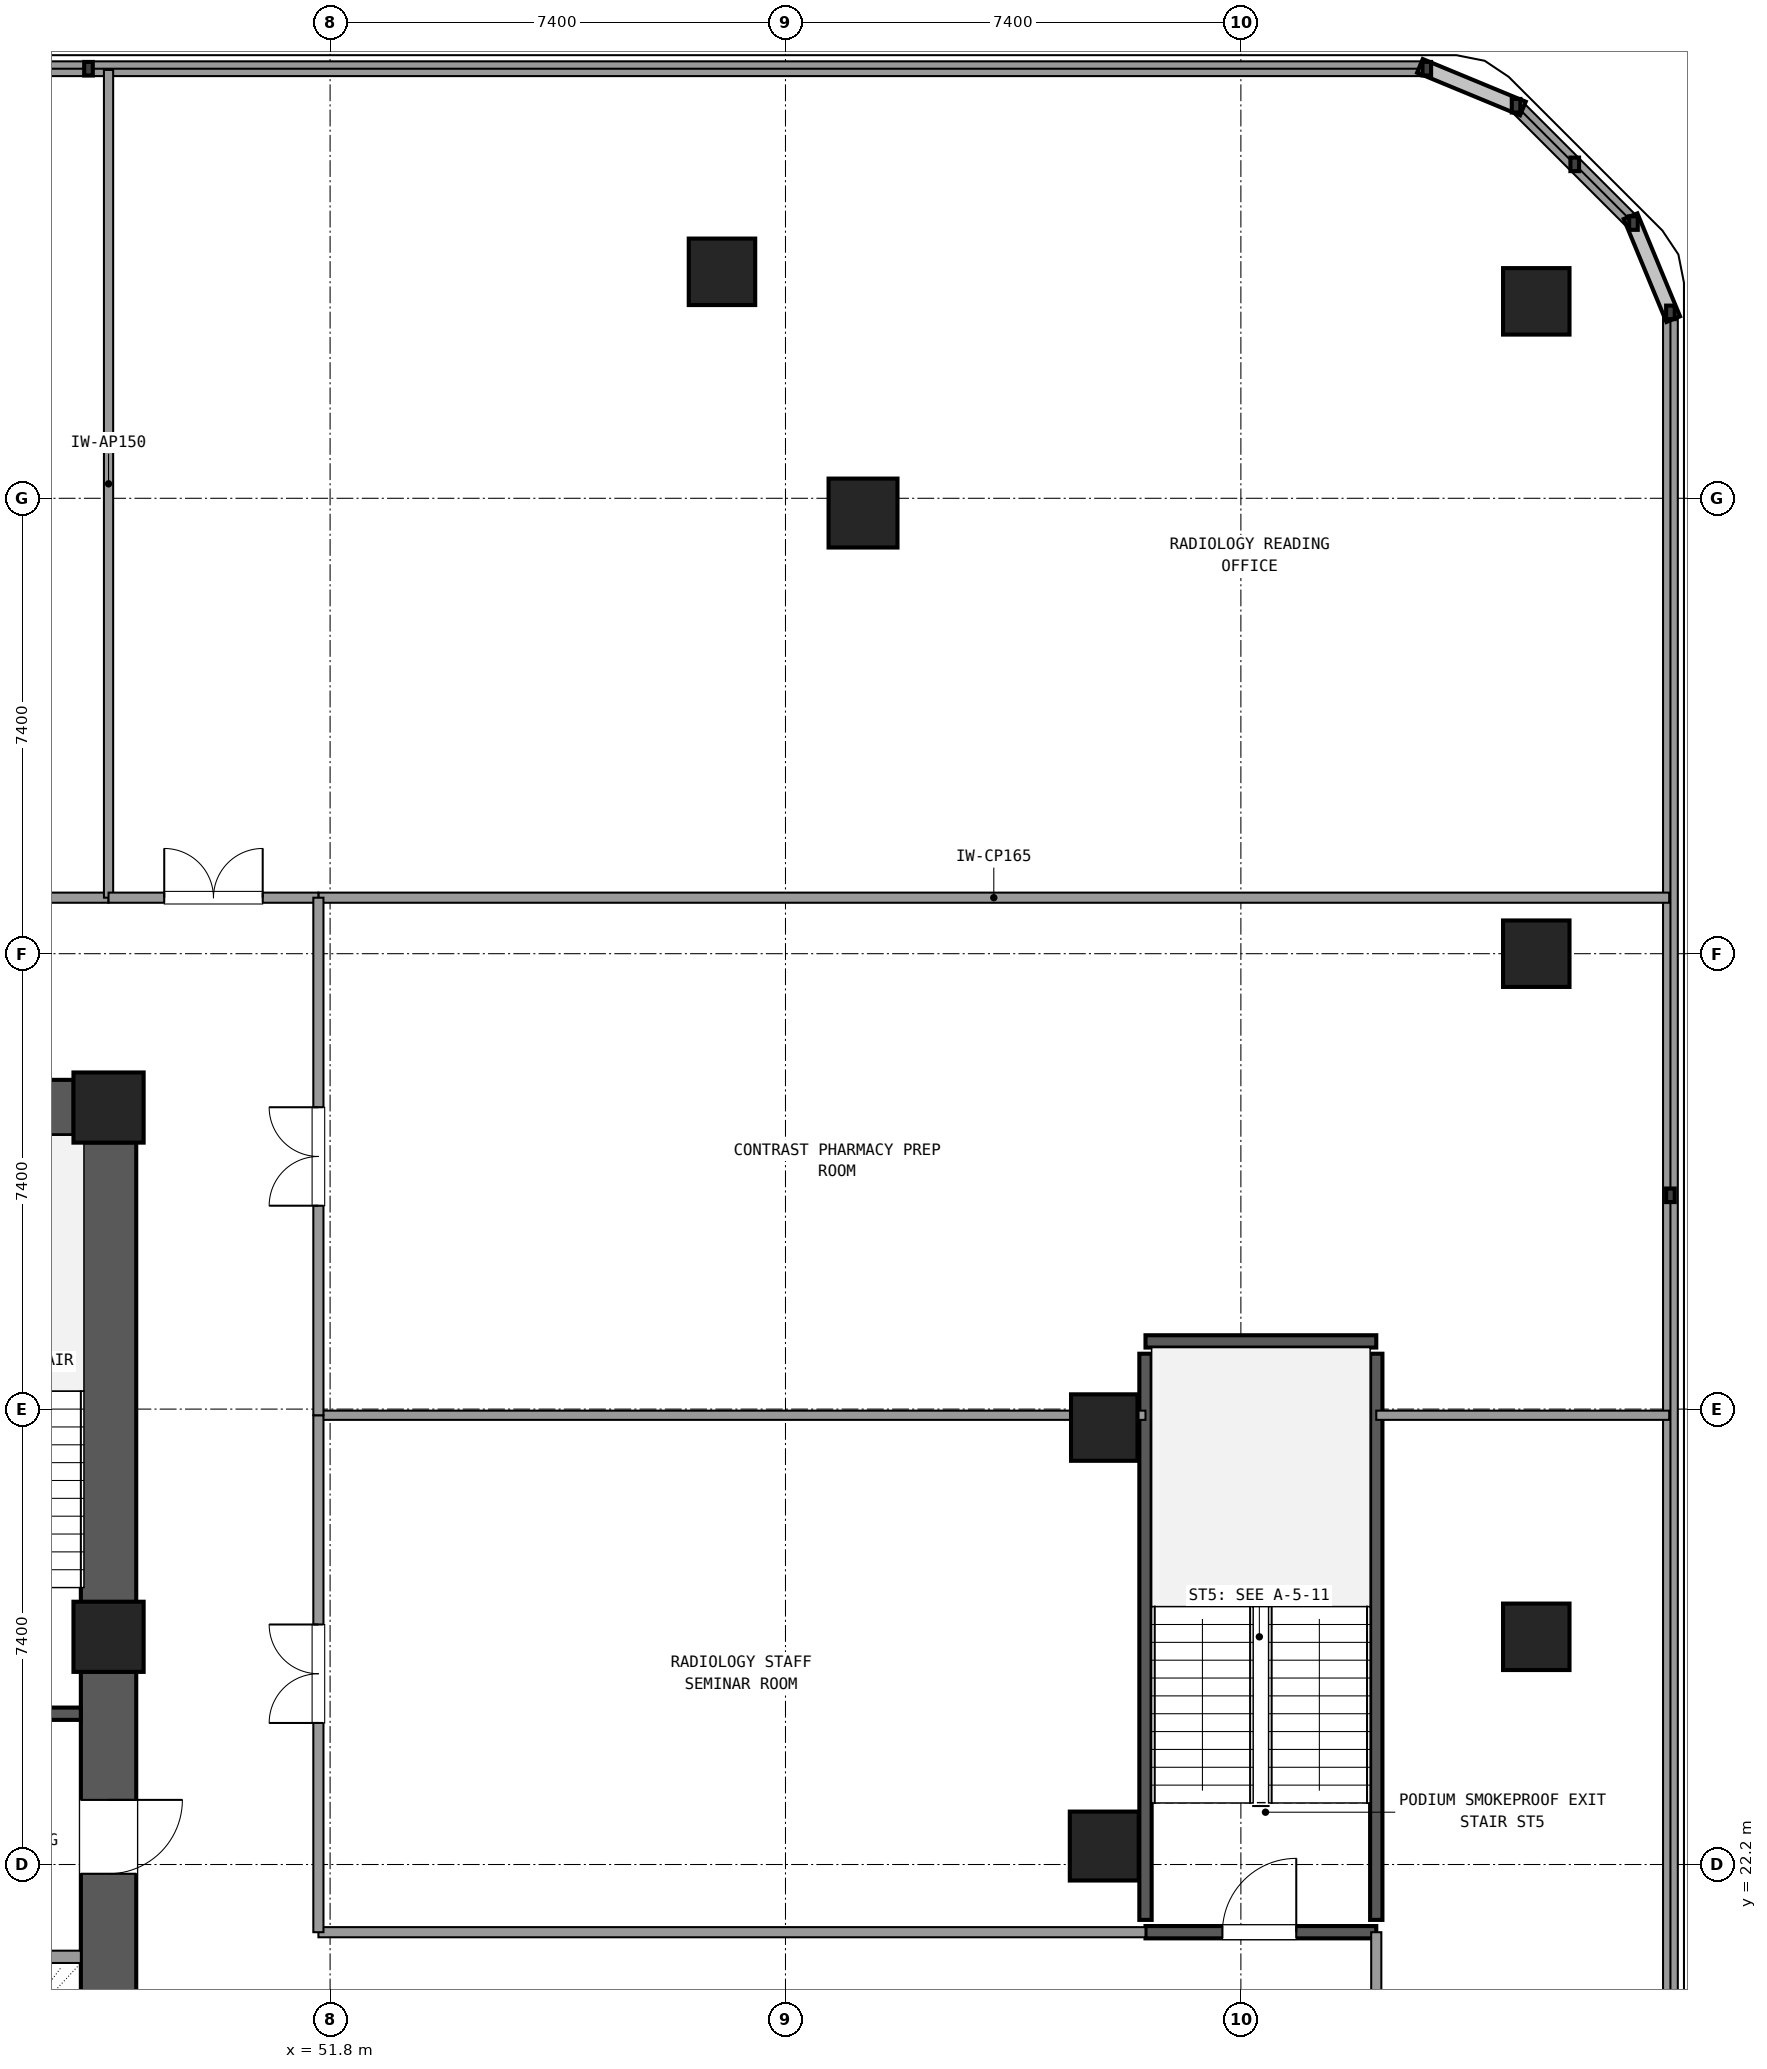
"""IFC4 building model, lengths in metres.
Left out: names, types, materials, properties, quantities, classifications, styles, units other than length and angle.
Written with IfcOpenShell. Run it as: python <this file> out.ifc"""

import sys

from ifc_helpers import new_model, si_unit, direction, frame, frame_2d, origin, origin_2d, place, context, subcontext, project, spatial, rectangle, circle, extrude, element, fill, save


model = new_model("IFC4")
c1 = context("Model", 3, precision=1e-05, world=origin(), true_north=direction((0.0, 1.0)))
c2 = subcontext(c1, "Body", "Model", "MODEL_VIEW")
j1 = project(units=[si_unit("LENGTHUNIT", "METRE"), si_unit("PLANEANGLEUNIT", "RADIAN")], contexts=[c1])
p1 = place(None, origin())
s1 = spatial("IfcSite", under=j1, at=p1, CompositionType="ELEMENT")
p2 = place(p1, origin())
s2 = spatial("IfcBuilding", under=s1, at=p2, CompositionType="ELEMENT")
p3 = place(p2, frame((0.0, 0.0, 9.9)))
s3 = spatial("IfcBuildingStorey", under=s2, at=p3, CompositionType="ELEMENT", Elevation=9.9)
for number, where, z_axis, x_axis in (
    (1, (48.2, 25.9, 0.0), (0.0, 0.0, 1.0), (1.0, 0.0, 0.0)),
    (2, (48.2, 34.5, 0.0), (0.0, 0.0, 1.0), (1.0, 0.0, 0.0)),
):
    element("IfcColumn", number, at=place(p3, frame(where, z_axis=z_axis, x_axis=x_axis)), inside=s3, PredefinedType="COLUMN", context=c2, shape_type="SweptSolid", body=[
        extrude(rectangle(XDim=1.14, YDim=1.14, at=origin_2d()), origin(), (0.0, 0.0, 1.0), 4.5),
    ])
p4 = place(p3, frame((48.2, 17.865, 0.0), z_axis=(0.0, 0.0, 1.0), x_axis=(0.0, 1.0, 0.0)))
e3 = element("IfcWall", 3, at=p4, inside=s3, PredefinedType="SHEAR", context=c2, shape_type="SweptSolid", body=[
    extrude(rectangle(XDim=7.47, YDim=0.9, at=frame_2d((3.735, 0.0))), origin(), (0.0, 0.0, 1.0), 4.2),
])
p5 = place(p4, frame((4.185, 0.0, 0.0)))
e4 = element("IfcOpeningElement", 4, at=p5, cuts=e3, PredefinedType="OPENING", context=c2, shape_type="SweptSolid", body=[
    extrude(rectangle(XDim=1.2, YDim=2.15, at=frame_2d((0.6, 1.075))), frame((0.0, 0.46, 0.0), z_axis=(0.0, -1.0, 0.0), x_axis=(1.0, 0.0, 0.0)), (0.0, 0.0, 1.0), 0.92),
])
p6 = place(p3, frame((48.2, 26.465, 0.0), z_axis=(0.0, 0.0, 1.0), x_axis=(0.0, 1.0, 0.0)))
e5 = element("IfcWall", 5, at=p6, inside=s3, PredefinedType="SHEAR", context=c2, shape_type="SweptSolid", body=[
    extrude(rectangle(XDim=7.47, YDim=0.9, at=frame_2d((3.735, 0.0))), origin(), (0.0, 0.0, 1.0), 4.2),
])
p7 = place(p3, frame((47.635, 34.5, 0.0), z_axis=(0.0, 0.0, 1.0), x_axis=(-1.0, 0.0, 0.0)))
e6 = element("IfcWall", 6, at=p7, inside=s3, PredefinedType="SHEAR", context=c2, shape_type="SweptSolid", body=[
    extrude(rectangle(XDim=10.07, YDim=0.9, at=frame_2d((5.035, 0.0))), origin(), (0.0, 0.0, 1.0), 4.2),
])
p8 = place(p7, frame((4.535, 0.0, 0.0)))
e7 = element("IfcOpeningElement", 7, at=p8, cuts=e6, PredefinedType="OPENING", context=c2, shape_type="SweptSolid", body=[
    extrude(rectangle(XDim=1.6, YDim=2.2, at=frame_2d((0.8, 1.1))), frame((0.0, 0.46, 0.0), z_axis=(0.0, -1.0, 0.0), x_axis=(1.0, 0.0, 0.0)), (0.0, 0.0, 1.0), 0.92),
])
p9 = place(p3, frame((64.38, 22.5, 0.0), z_axis=(0.0, 0.0, 1.0), x_axis=(1.0, 0.0, 0.0)))
e8 = element("IfcColumn", 8, at=p9, inside=s3, PredefinedType="COLUMN", context=c2, shape_type="SweptSolid", body=[
    extrude(circle(Radius=0.56, at=origin_2d()), origin(), (0.0, 0.0, 1.0), 4.5),
])
p10 = place(p3, frame((64.38, 29.3, 0.0), z_axis=(0.0, 0.0, 1.0), x_axis=(1.0, 0.0, 0.0)))
e9 = element("IfcColumn", 9, at=p10, inside=s3, PredefinedType="COLUMN", context=c2, shape_type="SweptSolid", body=[
    extrude(rectangle(XDim=1.08, YDim=1.08, at=origin_2d()), origin(), (0.0, 0.0, 1.0), 4.5),
])
p11 = place(p3, frame((60.46, 44.16, 0.0), z_axis=(0.0, 0.0, 1.0), x_axis=(1.0, 0.0, 0.0)))
e10 = element("IfcColumn", 10, at=p11, inside=s3, PredefinedType="COLUMN", context=c2, shape_type="SweptSolid", body=[
    extrude(circle(Radius=0.56, at=origin_2d()), origin(), (0.0, 0.0, 1.0), 4.5),
])
for number, where, z_axis, x_axis in (
    (11, (58.168, 48.08, 0.0), (0.0, 0.0, 1.0), (1.0, 0.0, 0.0)),
    (12, (71.4, 25.9, 0.0), (0.0, 0.0, 1.0), (1.0, 0.0, 0.0)),
    (13, (71.4, 37.0, 0.0), (0.0, 0.0, 1.0), (1.0, 0.0, 0.0)),
    (14, (71.4, 47.6, 0.0), (0.0, 0.0, 1.0), (1.0, 0.0, 0.0)),
):
    element("IfcColumn", number, at=place(p3, frame(where, z_axis=z_axis, x_axis=x_axis)), inside=s3, PredefinedType="COLUMN", context=c2, shape_type="SweptSolid", body=[
        extrude(rectangle(XDim=1.08, YDim=1.08, at=origin_2d()), origin(), (0.0, 0.0, 1.0), 4.5),
    ])
p12 = place(p3, frame((73.58, 4.379, 0.0), z_axis=(0.0, 0.0, 1.0), x_axis=(0.0, 1.0, 0.0)))
e15 = element("IfcWall", 15, at=p12, inside=s3, PredefinedType="SOLIDWALL", context=c2, shape_type="SweptSolid", body=[
    extrude(rectangle(XDim=43.042, YDim=0.24, at=frame_2d((21.521, 0.0))), origin(), (0.0, 0.0, 1.0), 0.85),
])
p13 = place(p3, frame((72.979, 48.872, 0.0), z_axis=(0.0, 0.0, 1.0), x_axis=(-0.707106781187, 0.707106781187, 0.0)))
e16 = element("IfcWall", 16, at=p13, inside=s3, PredefinedType="SOLIDWALL", context=c2, shape_type="SweptSolid", body=[
    extrude(rectangle(XDim=2.697, YDim=0.24, at=frame_2d((1.348, 0.0))), origin(), (0.0, 0.0, 1.0), 0.85),
])
p14 = place(p3, frame((69.621, 51.38, 0.0), z_axis=(0.0, 0.0, 1.0), x_axis=(-1.0, 0.0, 0.0)))
e17 = element("IfcWall", 17, at=p14, inside=s3, PredefinedType="SOLIDWALL", context=c2, shape_type="SweptSolid", body=[
    extrude(rectangle(XDim=65.242, YDim=0.24, at=frame_2d((32.621, 0.0))), origin(), (0.0, 0.0, 1.0), 0.85),
])
p15 = place(p3, frame((43.35, 24.65, 0.0), z_axis=(0.0, 0.0, 1.0), x_axis=(1.0, 0.0, 0.0)))
e18 = element("IfcWall", 18, at=p15, inside=s3, PredefinedType="SHEAR", context=c2, shape_type="SweptSolid", body=[
    extrude(rectangle(XDim=4.4, YDim=0.2, at=frame_2d((2.2, 0.0))), origin(), (0.0, 0.0, 1.0), 4.2),
])
p16 = place(p15, frame((2.0, 0.0, 0.0)))
e19 = element("IfcOpeningElement", 19, at=p16, cuts=e18, PredefinedType="OPENING", context=c2, shape_type="SweptSolid", body=[
    extrude(rectangle(XDim=1.2, YDim=2.15, at=frame_2d((0.6, 1.075))), frame((0.0, 0.11, 0.0), z_axis=(0.0, -1.0, 0.0), x_axis=(1.0, 0.0, 0.0)), (0.0, 0.0, 1.0), 0.22),
])
p17 = place(p3, frame((43.35, 20.7, 0.0), z_axis=(0.0, 0.0, 1.0), x_axis=(1.0, 0.0, 0.0)))
e20 = element("IfcWall", 20, at=p17, inside=s3, PredefinedType="SOLIDWALL", context=c2, shape_type="SweptSolid", body=[
    extrude(rectangle(XDim=4.4, YDim=0.2, at=frame_2d((2.2, 0.0))), origin(), (0.0, 0.0, 1.0), 3.21),
])
p18 = place(p17, frame((2.35, 0.0, 0.0)))
e21 = element("IfcOpeningElement", 21, at=p18, cuts=e20, PredefinedType="OPENING", context=c2, shape_type="SweptSolid", body=[
    extrude(rectangle(XDim=1.2, YDim=2.15, at=frame_2d((0.6, 1.075))), frame((0.0, 0.11, 0.0), z_axis=(0.0, -1.0, 0.0), x_axis=(1.0, 0.0, 0.0)), (0.0, 0.0, 1.0), 0.22),
])
p19 = place(p3, frame((65.05, 21.1, 0.0), z_axis=(0.0, 0.0, 1.0), x_axis=(1.0, 0.0, 0.0)))
e22 = element("IfcWall", 22, at=p19, inside=s3, PredefinedType="SHEAR", context=c2, shape_type="SweptSolid", body=[
    extrude(rectangle(XDim=3.75, YDim=0.2, at=frame_2d((1.875, 0.0))), origin(), (0.0, 0.0, 1.0), 4.2),
])
p20 = place(p19, frame((1.25, 0.0, 0.0)))
e23 = element("IfcOpeningElement", 23, at=p20, cuts=e22, PredefinedType="OPENING", context=c2, shape_type="SweptSolid", body=[
    extrude(rectangle(XDim=1.2, YDim=2.15, at=frame_2d((0.6, 1.075))), frame((0.0, 0.11, 0.0), z_axis=(0.0, -1.0, 0.0), x_axis=(1.0, 0.0, 0.0)), (0.0, 0.0, 1.0), 0.22),
])
p21 = place(p3, frame((65.05, 30.7, 0.0), z_axis=(0.0, 0.0, 1.0), x_axis=(1.0, 0.0, 0.0)))
e24 = element("IfcWall", 24, at=p21, inside=s3, PredefinedType="SHEAR", context=c2, shape_type="SweptSolid", body=[
    extrude(rectangle(XDim=3.75, YDim=0.2, at=frame_2d((1.875, 0.0))), origin(), (0.0, 0.0, 1.0), 4.2),
])
for number, where, z_axis, x_axis in (
    (25, (65.05, 21.3, 0.0), (0.0, 0.0, 1.0), (0.0, 1.0, 0.0)),
    (26, (68.8, 21.3, 0.0), (0.0, 0.0, 1.0), (0.0, 1.0, 0.0)),
):
    element("IfcWall", number, at=place(p3, frame(where, z_axis=z_axis, x_axis=x_axis)), inside=s3, PredefinedType="SHEAR", context=c2, shape_type="SweptSolid", body=[
        extrude(rectangle(XDim=9.2, YDim=0.2, at=frame_2d((4.6, 0.0))), origin(), (0.0, 0.0, 1.0), 4.2),
    ])
p22 = place(p3, frame((51.61, 37.91, 0.0), z_axis=(0.0, 0.0, 1.0), x_axis=(1.0, 0.0, 0.0)))
e27 = element("IfcWall", 27, at=p22, inside=s3, PredefinedType="PARTITIONING", context=c2, shape_type="SweptSolid", body=[
    extrude(rectangle(XDim=21.95, YDim=0.165, at=frame_2d((10.975, 0.0))), origin(), (0.0, 0.0, 1.0), 3.21),
])
p23 = place(p3, frame((68.8, 18.17, 0.0), z_axis=(0.0, 0.0, 1.0), x_axis=(0.0, 1.0, 0.0)))
e28 = element("IfcWall", 28, at=p23, inside=s3, PredefinedType="PARTITIONING", context=c2, shape_type="SweptSolid", body=[
    extrude(rectangle(XDim=2.93, YDim=0.165, at=frame_2d((1.465, 0.0))), origin(), (0.0, 0.0, 1.0), 3.21),
])
p24 = place(p3, frame((51.61, 21.1, 0.0), z_axis=(0.0, 0.0, 1.0), x_axis=(1.0, 0.0, 0.0)))
e29 = element("IfcWall", 29, at=p24, inside=s3, PredefinedType="PARTITIONING", context=c2, shape_type="SweptSolid", body=[
    extrude(rectangle(XDim=13.44, YDim=0.165, at=frame_2d((6.72, 0.0))), origin(), (0.0, 0.0, 1.0), 3.21),
])
p25 = place(p3, frame((39.8, 37.91, 0.0), z_axis=(0.0, 0.0, 1.0), x_axis=(1.0, 0.0, 0.0)))
e30 = element("IfcWall", 30, at=p25, inside=s3, PredefinedType="PARTITIONING", context=c2, shape_type="SweptSolid", body=[
    extrude(rectangle(XDim=8.4, YDim=0.165, at=frame_2d((4.2, 0.0))), origin(), (0.0, 0.0, 1.0), 3.21),
])
p26 = place(p25, frame((3.4, 0.0, 0.0)))
e31 = element("IfcOpeningElement", 31, at=p26, cuts=e30, PredefinedType="OPENING", context=c2, shape_type="SweptSolid", body=[
    extrude(rectangle(XDim=1.6, YDim=2.2, at=frame_2d((0.8, 1.1))), frame((0.0, 0.093, 0.0), z_axis=(0.0, -1.0, 0.0), x_axis=(1.0, 0.0, 0.0)), (0.0, 0.0, 1.0), 0.185),
])
p27 = place(p3, frame((48.2, 37.91, 0.0), z_axis=(0.0, 0.0, 1.0), x_axis=(0.0, 1.0, 0.0)))
e32 = element("IfcWall", 32, at=p27, inside=s3, PredefinedType="PARTITIONING", context=c2, shape_type="SweptSolid", body=[
    extrude(rectangle(XDim=13.45, YDim=0.15, at=frame_2d((6.725, 0.0))), origin(), (0.0, 0.0, 1.0), 3.21),
])
p28 = place(p3, frame((48.2, 37.91, 0.0), z_axis=(0.0, 0.0, 1.0), x_axis=(1.0, 0.0, 0.0)))
e33 = element("IfcWall", 33, at=p28, inside=s3, PredefinedType="PARTITIONING", context=c2, shape_type="SweptSolid", body=[
    extrude(rectangle(XDim=3.41, YDim=0.165, at=frame_2d((1.705, 0.0))), origin(), (0.0, 0.0, 1.0), 3.21),
])
p29 = place(p28, frame((0.905, 0.0, 0.0)))
e34 = element("IfcOpeningElement", 34, at=p29, cuts=e33, PredefinedType="OPENING", context=c2, shape_type="SweptSolid", body=[
    extrude(rectangle(XDim=1.6, YDim=2.2, at=frame_2d((0.8, 1.1))), frame((0.0, 0.093, 0.0), z_axis=(0.0, -1.0, 0.0), x_axis=(1.0, 0.0, 0.0)), (0.0, 0.0, 1.0), 0.185),
])
p30 = place(p3, frame((51.61, 29.5, 0.0), z_axis=(0.0, 0.0, 1.0), x_axis=(1.0, 0.0, 0.0)))
e35 = element("IfcWall", 35, at=p30, inside=s3, PredefinedType="PARTITIONING", context=c2, shape_type="SweptSolid", body=[
    extrude(rectangle(XDim=13.44, YDim=0.15, at=frame_2d((6.72, 0.0))), origin(), (0.0, 0.0, 1.0), 3.21),
])
p31 = place(p3, frame((68.8, 29.5, 0.0), z_axis=(0.0, 0.0, 1.0), x_axis=(1.0, 0.0, 0.0)))
e36 = element("IfcWall", 36, at=p31, inside=s3, PredefinedType="PARTITIONING", context=c2, shape_type="SweptSolid", body=[
    extrude(rectangle(XDim=4.76, YDim=0.15, at=frame_2d((2.38, 0.0))), origin(), (0.0, 0.0, 1.0), 3.21),
])
p32 = place(p3, frame((51.61, 21.1, 0.0), z_axis=(0.0, 0.0, 1.0), x_axis=(0.0, 1.0, 0.0)))
e37 = element("IfcWall", 37, at=p32, inside=s3, PredefinedType="PARTITIONING", context=c2, shape_type="SweptSolid", body=[
    extrude(rectangle(XDim=8.4, YDim=0.165, at=frame_2d((4.2, 0.0))), origin(), (0.0, 0.0, 1.0), 3.21),
])
p33 = place(p32, frame((3.4, 0.0, 0.0)))
e38 = element("IfcOpeningElement", 38, at=p33, cuts=e37, PredefinedType="OPENING", context=c2, shape_type="SweptSolid", body=[
    extrude(rectangle(XDim=1.6, YDim=2.2, at=frame_2d((0.8, 1.1))), frame((0.0, 0.093, 0.0), z_axis=(0.0, -1.0, 0.0), x_axis=(1.0, 0.0, 0.0)), (0.0, 0.0, 1.0), 0.185),
])
p34 = place(p3, frame((51.61, 29.5, 0.0), z_axis=(0.0, 0.0, 1.0), x_axis=(0.0, 1.0, 0.0)))
e39 = element("IfcWall", 39, at=p34, inside=s3, PredefinedType="PARTITIONING", context=c2, shape_type="SweptSolid", body=[
    extrude(rectangle(XDim=8.41, YDim=0.165, at=frame_2d((4.205, 0.0))), origin(), (0.0, 0.0, 1.0), 3.21),
])
p35 = place(p34, frame((3.405, 0.0, 0.0)))
e40 = element("IfcOpeningElement", 40, at=p35, cuts=e39, PredefinedType="OPENING", context=c2, shape_type="SweptSolid", body=[
    extrude(rectangle(XDim=1.6, YDim=2.2, at=frame_2d((0.8, 1.1))), frame((0.0, 0.093, 0.0), z_axis=(0.0, -1.0, 0.0), x_axis=(1.0, 0.0, 0.0)), (0.0, 0.0, 1.0), 0.185),
])
p36 = place(p5, frame((1.2, 0.0, 0.0), z_axis=(0.0, 0.0, 1.0), x_axis=(-1.0, 0.0, 0.0)))
e41 = element("IfcDoor", 41, at=p36, inside=s3, OperationType="SINGLE_SWING_RIGHT", PredefinedType="DOOR", context=c2, shape_type="SweptSolid", body=[
    extrude(rectangle(XDim=1.2, YDim=2.15, at=frame_2d((0.6, 1.075))), frame((0.0, 0.025, 0.0), z_axis=(0.0, -1.0, 0.0), x_axis=(1.0, 0.0, 0.0)), (0.0, 0.0, 1.0), 0.05),
])
fill(e4, e41)
p37 = place(p20, origin())
e42 = element("IfcDoor", 42, at=p37, inside=s3, OperationType="SINGLE_SWING_RIGHT", PredefinedType="DOOR", context=c2, shape_type="SweptSolid", body=[
    extrude(rectangle(XDim=1.2, YDim=2.15, at=frame_2d((0.6, 1.075))), frame((0.0, 0.025, 0.0), z_axis=(0.0, -1.0, 0.0), x_axis=(1.0, 0.0, 0.0)), (0.0, 0.0, 1.0), 0.05),
])
fill(e23, e42)
p38 = place(p29, origin())
e43 = element("IfcDoor", 43, at=p38, inside=s3, OperationType="DOUBLE_DOOR_SINGLE_SWING", PredefinedType="DOOR", context=c2, shape_type="SweptSolid", body=[
    extrude(rectangle(XDim=1.6, YDim=2.2, at=frame_2d((0.8, 1.1))), frame((0.0, 0.025, 0.0), z_axis=(0.0, -1.0, 0.0), x_axis=(1.0, 0.0, 0.0)), (0.0, 0.0, 1.0), 0.05),
])
fill(e34, e43)
p39 = place(p33, origin())
e44 = element("IfcDoor", 44, at=p39, inside=s3, OperationType="DOUBLE_DOOR_SINGLE_SWING", PredefinedType="DOOR", context=c2, shape_type="SweptSolid", body=[
    extrude(rectangle(XDim=1.6, YDim=2.2, at=frame_2d((0.8, 1.1))), frame((0.0, 0.025, 0.0), z_axis=(0.0, -1.0, 0.0), x_axis=(1.0, 0.0, 0.0)), (0.0, 0.0, 1.0), 0.05),
])
fill(e38, e44)
p40 = place(p35, origin())
e45 = element("IfcDoor", 45, at=p40, inside=s3, OperationType="DOUBLE_DOOR_SINGLE_SWING", PredefinedType="DOOR", context=c2, shape_type="SweptSolid", body=[
    extrude(rectangle(XDim=1.6, YDim=2.2, at=frame_2d((0.8, 1.1))), frame((0.0, 0.025, 0.0), z_axis=(0.0, -1.0, 0.0), x_axis=(1.0, 0.0, 0.0)), (0.0, 0.0, 1.0), 0.05),
])
fill(e40, e45)
save(model, sys.argv[1])
